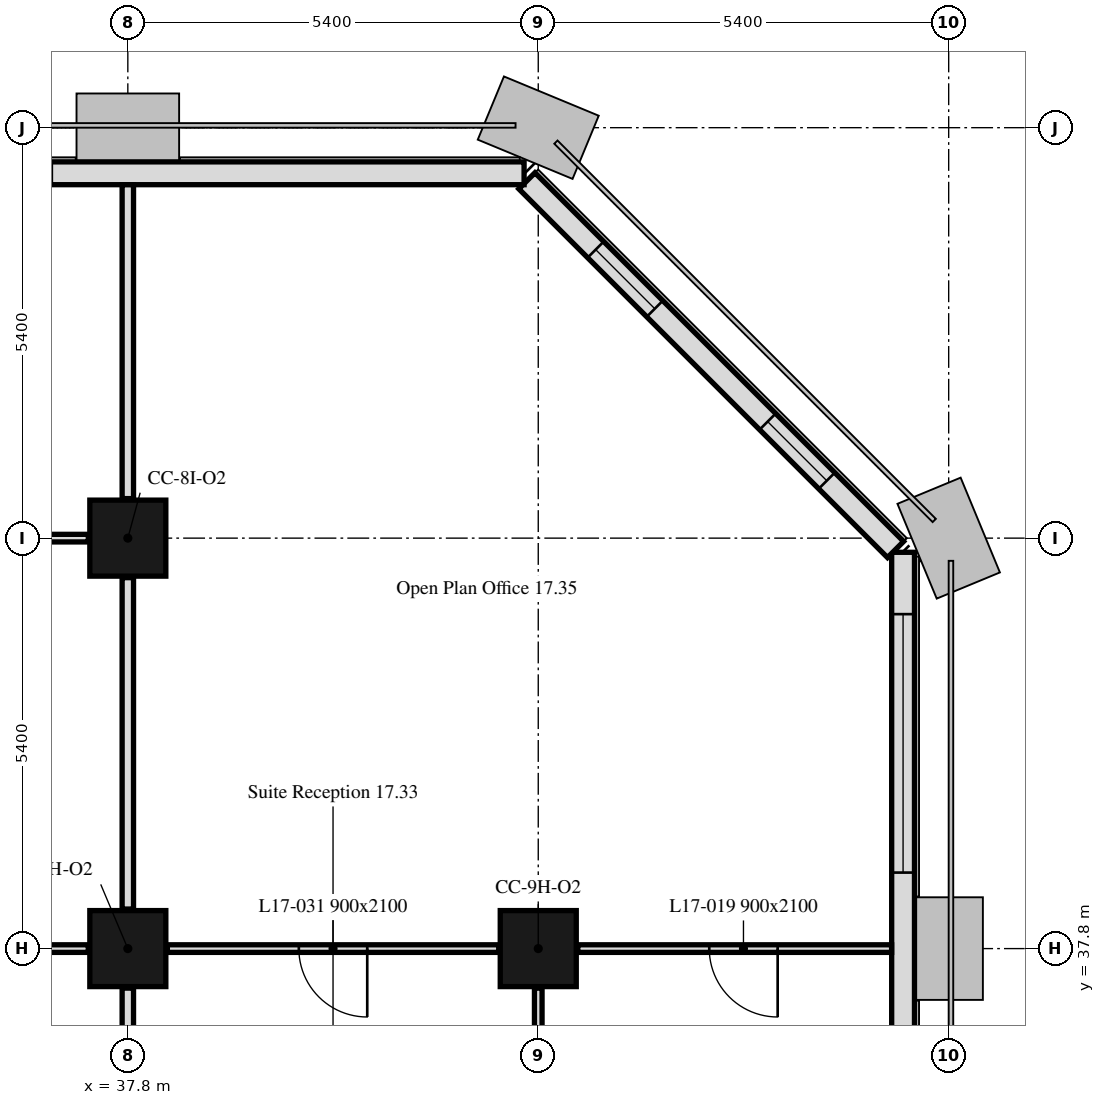
"""IFC4 building model, lengths in metres.
Left out: names, types, materials, properties, quantities, classifications, styles, units other than length and angle.
Written with IfcOpenShell. Run it as: python <this file> out.ifc"""

import sys

from ifc_helpers import new_model, si_unit, direction, frame, frame_2d, origin, origin_2d, place, context, subcontext, project, spatial, rectangle, extrude, element, fill, save


model = new_model("IFC4")
c1 = context("Model", 3, precision=1e-05, world=origin(), true_north=direction((0.0, 1.0)))
c2 = subcontext(c1, "Body", "Model", "MODEL_VIEW")
j1 = project(units=[si_unit("LENGTHUNIT", "METRE"), si_unit("PLANEANGLEUNIT", "RADIAN")], contexts=[c1])
p1 = place(None, origin())
s1 = spatial("IfcSite", under=j1, at=p1, CompositionType="ELEMENT")
p2 = place(p1, origin())
s2 = spatial("IfcBuilding", under=s1, at=p2, CompositionType="ELEMENT")
p3 = place(p2, frame((0.0, 0.0, 76.4)))
s3 = spatial("IfcBuildingStorey", under=s2, at=p3, CompositionType="ELEMENT", Elevation=76.4)
for number, where, z_axis, x_axis in (
    (1, (37.8, 37.8, 0.0), (0.0, 0.0, 1.0), (1.0, 0.0, 0.0)),
    (2, (43.2, 37.8, 0.0), (0.0, 0.0, 1.0), (1.0, 0.0, 0.0)),
    (3, (37.8, 43.2, 0.0), (0.0, 0.0, 1.0), (1.0, 0.0, 0.0)),
):
    element("IfcColumn", number, at=place(p3, frame(where, z_axis=z_axis, x_axis=x_axis)), inside=s3, PredefinedType="COLUMN", context=c2, shape_type="SweptSolid", body=[
        extrude(rectangle(XDim=1.0, YDim=1.0, at=origin_2d()), origin(), (0.0, 0.0, 1.0), 3.5),
    ])
p4 = place(p3, frame((48.0, 10.986, 0.0), z_axis=(0.0, 0.0, 1.0), x_axis=(0.0, 1.0, 0.0)))
e4 = element("IfcWall", 4, at=p4, inside=s3, PredefinedType="SOLIDWALL", context=c2, shape_type="SweptSolid", body=[
    extrude(rectangle(XDim=32.027, YDim=0.3, at=frame_2d((16.014, 0.0))), origin(), (0.0, 0.0, 1.0), 3.5),
])
p5 = place(p4, frame((6.214, 0.0, 0.9)))
e5 = element("IfcOpeningElement", 5, at=p5, cuts=e4, PredefinedType="OPENING", context=c2, shape_type="SweptSolid", body=[
    extrude(rectangle(XDim=3.4, YDim=1.7, at=frame_2d((1.7, 0.85))), frame((0.0, 0.16, 0.0), z_axis=(0.0, -1.0, 0.0), x_axis=(1.0, 0.0, 0.0)), (0.0, 0.0, 1.0), 0.32),
])
p6 = place(p4, frame((17.014, 0.0, 0.9)))
e6 = element("IfcOpeningElement", 6, at=p6, cuts=e4, PredefinedType="OPENING", context=c2, shape_type="SweptSolid", body=[
    extrude(rectangle(XDim=3.4, YDim=1.7, at=frame_2d((1.7, 0.85))), frame((0.0, 0.16, 0.0), z_axis=(0.0, -1.0, 0.0), x_axis=(1.0, 0.0, 0.0)), (0.0, 0.0, 1.0), 0.32),
])
p7 = place(p4, frame((27.814, 0.0, 0.9)))
e7 = element("IfcOpeningElement", 7, at=p7, cuts=e4, PredefinedType="OPENING", context=c2, shape_type="SweptSolid", body=[
    extrude(rectangle(XDim=3.4, YDim=1.7, at=frame_2d((1.7, 0.85))), frame((0.0, 0.16, 0.0), z_axis=(0.0, -1.0, 0.0), x_axis=(1.0, 0.0, 0.0)), (0.0, 0.0, 1.0), 0.32),
])
p8 = place(p3, frame((47.901, 43.051, 0.0), z_axis=(0.0, 0.0, 1.0), x_axis=(-0.707106781187, 0.707106781187, 0.0)))
e8 = element("IfcWall", 8, at=p8, inside=s3, PredefinedType="SOLIDWALL", context=c2, shape_type="SweptSolid", body=[
    extrude(rectangle(XDim=6.86, YDim=0.3, at=frame_2d((3.43, 0.0))), origin(), (0.0, 0.0, 1.0), 3.5),
])
p9 = place(p8, frame((1.28, 0.0, 0.9)))
e9 = element("IfcOpeningElement", 9, at=p9, cuts=e8, PredefinedType="OPENING", context=c2, shape_type="SweptSolid", body=[
    extrude(rectangle(XDim=1.1, YDim=1.7, at=frame_2d((0.55, 0.85))), frame((0.0, 0.16, 0.0), z_axis=(0.0, -1.0, 0.0), x_axis=(1.0, 0.0, 0.0)), (0.0, 0.0, 1.0), 0.32),
])
p10 = place(p8, frame((4.48, 0.0, 0.9)))
e10 = element("IfcOpeningElement", 10, at=p10, cuts=e8, PredefinedType="OPENING", context=c2, shape_type="SweptSolid", body=[
    extrude(rectangle(XDim=1.1, YDim=1.7, at=frame_2d((0.55, 0.85))), frame((0.0, 0.16, 0.0), z_axis=(0.0, -1.0, 0.0), x_axis=(1.0, 0.0, 0.0)), (0.0, 0.0, 1.0), 0.32),
])
p11 = place(p3, frame((43.014, 48.0, 0.0), z_axis=(0.0, 0.0, 1.0), x_axis=(-1.0, 0.0, 0.0)))
e11 = element("IfcWall", 11, at=p11, inside=s3, PredefinedType="SOLIDWALL", context=c2, shape_type="SweptSolid", body=[
    extrude(rectangle(XDim=32.027, YDim=0.3, at=frame_2d((16.014, 0.0))), origin(), (0.0, 0.0, 1.0), 3.5),
])
p12 = place(p11, frame((6.214, 0.0, 0.9)))
e12 = element("IfcOpeningElement", 12, at=p12, cuts=e11, PredefinedType="OPENING", context=c2, shape_type="SweptSolid", body=[
    extrude(rectangle(XDim=3.4, YDim=1.7, at=frame_2d((1.7, 0.85))), frame((0.0, 0.16, 0.0), z_axis=(0.0, -1.0, 0.0), x_axis=(1.0, 0.0, 0.0)), (0.0, 0.0, 1.0), 0.32),
])
p13 = place(p11, frame((17.014, 0.0, 0.9)))
e13 = element("IfcOpeningElement", 13, at=p13, cuts=e11, PredefinedType="OPENING", context=c2, shape_type="SweptSolid", body=[
    extrude(rectangle(XDim=3.4, YDim=1.7, at=frame_2d((1.7, 0.85))), frame((0.0, 0.16, 0.0), z_axis=(0.0, -1.0, 0.0), x_axis=(1.0, 0.0, 0.0)), (0.0, 0.0, 1.0), 0.32),
])
p14 = place(p11, frame((27.814, 0.0, 0.9)))
e14 = element("IfcOpeningElement", 14, at=p14, cuts=e11, PredefinedType="OPENING", context=c2, shape_type="SweptSolid", body=[
    extrude(rectangle(XDim=3.4, YDim=1.7, at=frame_2d((1.7, 0.85))), frame((0.0, 0.16, 0.0), z_axis=(0.0, -1.0, 0.0), x_axis=(1.0, 0.0, 0.0)), (0.0, 0.0, 1.0), 0.32),
])
p15 = place(p3, frame((37.8, 35.175, 0.0), z_axis=(0.0, 0.0, 1.0), x_axis=(0.0, 1.0, 0.0)))
e15 = element("IfcWall", 15, at=p15, inside=s3, PredefinedType="PARTITIONING", context=c2, shape_type="SweptSolid", body=[
    extrude(rectangle(XDim=2.105, YDim=0.15, at=frame_2d((1.052, 0.0))), origin(), (0.0, 0.0, 1.0), 2.75),
])
p16 = place(p3, frame((37.28, 37.8, 0.0), z_axis=(0.0, 0.0, 1.0), x_axis=(-1.0, 0.0, 0.0)))
e16 = element("IfcWall", 16, at=p16, inside=s3, PredefinedType="PARTITIONING", context=c2, shape_type="SweptSolid", body=[
    extrude(rectangle(XDim=4.36, YDim=0.1, at=frame_2d((2.18, 0.0))), origin(), (0.0, 0.0, 1.0), 2.75),
])
p17 = place(p3, frame((37.8, 38.32, 0.0), z_axis=(0.0, 0.0, 1.0), x_axis=(0.0, 1.0, 0.0)))
e17 = element("IfcWall", 17, at=p17, inside=s3, PredefinedType="PARTITIONING", context=c2, shape_type="SweptSolid", body=[
    extrude(rectangle(XDim=4.36, YDim=0.15, at=frame_2d((2.18, 0.0))), origin(), (0.0, 0.0, 1.0), 2.75),
])
p18 = place(p3, frame((37.28, 43.2, 0.0), z_axis=(0.0, 0.0, 1.0), x_axis=(-1.0, 0.0, 0.0)))
e18 = element("IfcWall", 18, at=p18, inside=s3, PredefinedType="PARTITIONING", context=c2, shape_type="SweptSolid", body=[
    extrude(rectangle(XDim=4.36, YDim=0.1, at=frame_2d((2.18, 0.0))), origin(), (0.0, 0.0, 1.0), 3.5),
])
p19 = place(p18, frame((1.73, 0.0, 0.0)))
e19 = element("IfcOpeningElement", 19, at=p19, cuts=e18, PredefinedType="OPENING", context=c2, shape_type="SweptSolid", body=[
    extrude(rectangle(XDim=0.9, YDim=2.1, at=frame_2d((0.45, 1.05))), frame((0.0, 0.05, 0.0), z_axis=(0.0, -1.0, 0.0), x_axis=(1.0, 0.0, 0.0)), (0.0, 0.0, 1.0), 0.1),
])
p20 = place(p3, frame((37.8, 43.72, 0.0), z_axis=(0.0, 0.0, 1.0), x_axis=(0.0, 1.0, 0.0)))
e20 = element("IfcWall", 20, at=p20, inside=s3, PredefinedType="PARTITIONING", context=c2, shape_type="SweptSolid", body=[
    extrude(rectangle(XDim=4.129, YDim=0.15, at=frame_2d((2.064, 0.0))), origin(), (0.0, 0.0, 1.0), 2.75),
])
p21 = place(p3, frame((43.2, 35.175, 0.0), z_axis=(0.0, 0.0, 1.0), x_axis=(0.0, 1.0, 0.0)))
e21 = element("IfcWall", 21, at=p21, inside=s3, PredefinedType="PARTITIONING", context=c2, shape_type="SweptSolid", body=[
    extrude(rectangle(XDim=2.105, YDim=0.1, at=frame_2d((1.052, 0.0))), origin(), (0.0, 0.0, 1.0), 3.5),
])
p22 = place(p3, frame((42.68, 37.8, 0.0), z_axis=(0.0, 0.0, 1.0), x_axis=(-1.0, 0.0, 0.0)))
e22 = element("IfcWall", 22, at=p22, inside=s3, PredefinedType="PARTITIONING", context=c2, shape_type="SweptSolid", body=[
    extrude(rectangle(XDim=4.36, YDim=0.1, at=frame_2d((2.18, 0.0))), origin(), (0.0, 0.0, 1.0), 2.75),
])
p23 = place(p22, frame((1.73, 0.0, 0.0)))
e23 = element("IfcOpeningElement", 23, at=p23, cuts=e22, PredefinedType="OPENING", context=c2, shape_type="SweptSolid", body=[
    extrude(rectangle(XDim=0.9, YDim=2.1, at=frame_2d((0.45, 1.05))), frame((0.0, 0.05, 0.0), z_axis=(0.0, -1.0, 0.0), x_axis=(1.0, 0.0, 0.0)), (0.0, 0.0, 1.0), 0.1),
])
p24 = place(p3, frame((47.849, 37.8, 0.0), z_axis=(0.0, 0.0, 1.0), x_axis=(-1.0, 0.0, 0.0)))
e24 = element("IfcWall", 24, at=p24, inside=s3, PredefinedType="PARTITIONING", context=c2, shape_type="SweptSolid", body=[
    extrude(rectangle(XDim=4.129, YDim=0.1, at=frame_2d((2.064, 0.0))), origin(), (0.0, 0.0, 1.0), 2.75),
])
p25 = place(p24, frame((1.499, 0.0, 0.0)))
e25 = element("IfcOpeningElement", 25, at=p25, cuts=e24, PredefinedType="OPENING", context=c2, shape_type="SweptSolid", body=[
    extrude(rectangle(XDim=0.9, YDim=2.1, at=frame_2d((0.45, 1.05))), frame((0.0, 0.05, 0.0), z_axis=(0.0, -1.0, 0.0), x_axis=(1.0, 0.0, 0.0)), (0.0, 0.0, 1.0), 0.1),
])
p26 = place(p7, origin())
e26 = element("IfcWindow", 26, at=p26, inside=s3, PartitioningType="SINGLE_PANEL", PredefinedType="WINDOW", context=c2, shape_type="SweptSolid", body=[
    extrude(rectangle(XDim=3.4, YDim=1.7, at=frame_2d((1.7, 0.85))), frame((0.0, 0.03, 0.0), z_axis=(0.0, -1.0, 0.0), x_axis=(1.0, 0.0, 0.0)), (0.0, 0.0, 1.0), 0.06),
])
fill(e7, e26)
p27 = place(p9, origin())
e27 = element("IfcWindow", 27, at=p27, inside=s3, PartitioningType="SINGLE_PANEL", PredefinedType="WINDOW", context=c2, shape_type="SweptSolid", body=[
    extrude(rectangle(XDim=1.1, YDim=1.7, at=frame_2d((0.55, 0.85))), frame((0.0, 0.03, 0.0), z_axis=(0.0, -1.0, 0.0), x_axis=(1.0, 0.0, 0.0)), (0.0, 0.0, 1.0), 0.06),
])
fill(e9, e27)
p28 = place(p10, origin())
e28 = element("IfcWindow", 28, at=p28, inside=s3, PartitioningType="SINGLE_PANEL", PredefinedType="WINDOW", context=c2, shape_type="SweptSolid", body=[
    extrude(rectangle(XDim=1.1, YDim=1.7, at=frame_2d((0.55, 0.85))), frame((0.0, 0.03, 0.0), z_axis=(0.0, -1.0, 0.0), x_axis=(1.0, 0.0, 0.0)), (0.0, 0.0, 1.0), 0.06),
])
fill(e10, e28)
p29 = place(p25, origin())
e29 = element("IfcDoor", 29, at=p29, inside=s3, OperationType="SINGLE_SWING_LEFT", PredefinedType="DOOR", context=c2, shape_type="SweptSolid", body=[
    extrude(rectangle(XDim=0.9, YDim=2.1, at=frame_2d((0.45, 1.05))), frame((0.0, 0.025, 0.0), z_axis=(0.0, -1.0, 0.0), x_axis=(1.0, 0.0, 0.0)), (0.0, 0.0, 1.0), 0.05),
])
fill(e25, e29)
p30 = place(p23, origin())
e30 = element("IfcDoor", 30, at=p30, inside=s3, OperationType="SINGLE_SWING_RIGHT", PredefinedType="DOOR", context=c2, shape_type="SweptSolid", body=[
    extrude(rectangle(XDim=0.9, YDim=2.1, at=frame_2d((0.45, 1.05))), frame((0.0, 0.025, 0.0), z_axis=(0.0, -1.0, 0.0), x_axis=(1.0, 0.0, 0.0)), (0.0, 0.0, 1.0), 0.05),
])
fill(e23, e30)
save(model, sys.argv[1])
